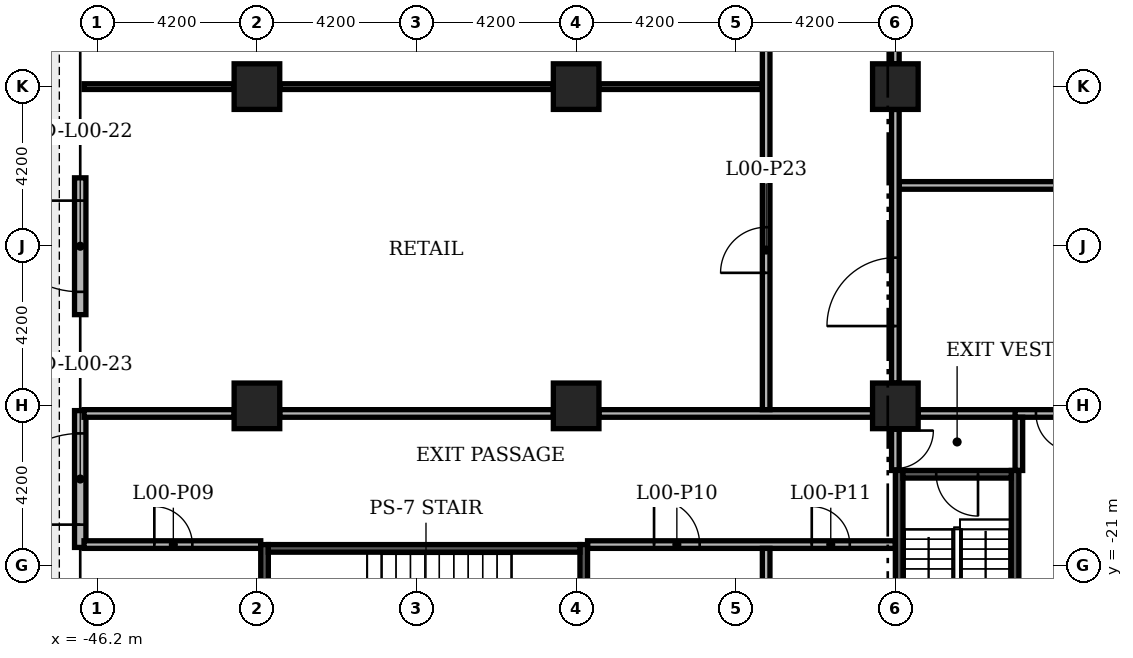
"""IFC4 building model, lengths in metres.
Left out: names, types, materials, properties, quantities, classifications, styles, units other than length and angle.
Written with IfcOpenShell. Run it as: python <this file> out.ifc"""

import sys

from ifc_helpers import new_model, si_unit, direction, frame, frame_2d, origin, origin_2d, place, context, subcontext, project, spatial, rectangle, extrude, element, fill, save


model = new_model("IFC4")
c1 = context("Model", 3, precision=1e-05, world=origin(), true_north=direction((0.0, 1.0)))
c2 = subcontext(c1, "Body", "Model", "MODEL_VIEW")
j1 = project(units=[si_unit("LENGTHUNIT", "METRE"), si_unit("PLANEANGLEUNIT", "RADIAN")], contexts=[c1])
p1 = place(None, origin())
s1 = spatial("IfcSite", under=j1, at=p1, CompositionType="ELEMENT")
p2 = place(p1, origin())
s2 = spatial("IfcBuilding", under=s1, at=p2, CompositionType="ELEMENT")
p3 = place(p2, origin())
s3 = spatial("IfcBuildingStorey", under=s2, at=p3, CompositionType="ELEMENT", Elevation=0.0)
for number, where, z_axis, x_axis in (
    (1, (-25.2, -8.4, 0.0), (0.0, 0.0, 1.0), (1.0, 0.0, 0.0)),
    (2, (-25.2, -16.8, 0.0), (0.0, 0.0, 1.0), (1.0, 0.0, 0.0)),
    (3, (-33.6, -8.4, 0.0), (0.0, 0.0, 1.0), (1.0, 0.0, 0.0)),
    (4, (-33.6, -16.8, 0.0), (0.0, 0.0, 1.0), (1.0, 0.0, 0.0)),
    (5, (-42.0, -8.4, 0.0), (0.0, 0.0, 1.0), (1.0, 0.0, 0.0)),
    (6, (-42.0, -16.8, 0.0), (0.0, 0.0, 1.0), (1.0, 0.0, 0.0)),
):
    element("IfcColumn", number, at=place(p3, frame(where, z_axis=z_axis, x_axis=x_axis)), inside=s3, PredefinedType="COLUMN", context=c2, shape_type="SweptSolid", body=[
        extrude(rectangle(XDim=1.2, YDim=1.2, at=origin_2d()), origin(), (0.0, 0.0, 1.0), 7.2),
    ])
p4 = place(p3, frame((-46.65, -10.8, 0.0), z_axis=(0.0, 0.0, 1.0), x_axis=(0.0, -1.0, 0.0)))
e7 = element("IfcWall", 7, at=p4, inside=s3, PredefinedType="STANDARD", context=c2, shape_type="SweptSolid", body=[
    extrude(rectangle(XDim=3.6, YDim=0.3, at=frame_2d((1.8, 0.0))), origin(), (0.0, 0.0, 1.0), 6.78),
])
p5 = place(p4, frame((0.6, 0.0, 0.0)))
e8 = element("IfcOpeningElement", 8, at=p5, cuts=e7, PredefinedType="OPENING", context=c2, shape_type="SweptSolid", body=[
    extrude(rectangle(XDim=2.4, YDim=2.4, at=frame_2d((1.2, 1.2))), frame((0.0, 0.16, 0.0), z_axis=(0.0, -1.0, 0.0), x_axis=(1.0, 0.0, 0.0)), (0.0, 0.0, 1.0), 0.32),
])
p6 = place(p3, frame((-46.65, -16.925, 0.0), z_axis=(0.0, 0.0, 1.0), x_axis=(0.0, -1.0, 0.0)))
e9 = element("IfcWall", 9, at=p6, inside=s3, PredefinedType="STANDARD", context=c2, shape_type="SweptSolid", body=[
    extrude(rectangle(XDim=3.6, YDim=0.3, at=frame_2d((1.8, 0.0))), origin(), (0.0, 0.0, 1.0), 6.78),
])
p7 = place(p6, frame((0.6, 0.0, 0.0)))
e10 = element("IfcOpeningElement", 10, at=p7, cuts=e9, PredefinedType="OPENING", context=c2, shape_type="SweptSolid", body=[
    extrude(rectangle(XDim=2.4, YDim=2.4, at=frame_2d((1.2, 1.2))), frame((0.0, 0.16, 0.0), z_axis=(0.0, -1.0, 0.0), x_axis=(1.0, 0.0, 0.0)), (0.0, 0.0, 1.0), 0.32),
])
p8 = place(p3, frame((-46.55, -20.45, 0.0), z_axis=(0.0, 0.0, 1.0), x_axis=(1.0, 0.0, 0.0)))
e11 = element("IfcWall", 11, at=p8, inside=s3, PredefinedType="PARTITIONING", context=c2, shape_type="SweptSolid", body=[
    extrude(rectangle(XDim=4.65, YDim=0.2, at=frame_2d((2.325, 0.0))), origin(), (0.0, 0.0, 1.0), 6.38),
])
p9 = place(p8, frame((1.85, 0.0, 0.0)))
e12 = element("IfcOpeningElement", 12, at=p9, cuts=e11, PredefinedType="OPENING", context=c2, shape_type="SweptSolid", body=[
    extrude(rectangle(XDim=1.0, YDim=2.1, at=frame_2d((0.5, 1.05))), frame((0.0, 0.11, 0.0), z_axis=(0.0, -1.0, 0.0), x_axis=(1.0, 0.0, 0.0)), (0.0, 0.0, 1.0), 0.22),
])
p10 = place(p3, frame((-33.3, -20.45, 0.0), z_axis=(0.0, 0.0, 1.0), x_axis=(1.0, 0.0, 0.0)))
e13 = element("IfcWall", 13, at=p10, inside=s3, PredefinedType="PARTITIONING", context=c2, shape_type="SweptSolid", body=[
    extrude(rectangle(XDim=8.1, YDim=0.2, at=frame_2d((4.05, 0.0))), origin(), (0.0, 0.0, 1.0), 6.78),
])
p11 = place(p10, frame((1.75, 0.0, 0.0)))
e14 = element("IfcOpeningElement", 14, at=p11, cuts=e13, PredefinedType="OPENING", context=c2, shape_type="SweptSolid", body=[
    extrude(rectangle(XDim=1.2, YDim=2.2, at=frame_2d((0.6, 1.1))), frame((0.0, 0.11, 0.0), z_axis=(0.0, -1.0, 0.0), x_axis=(1.0, 0.0, 0.0)), (0.0, 0.0, 1.0), 0.22),
])
p12 = place(p10, frame((5.9, 0.0, 0.0)))
e15 = element("IfcOpeningElement", 15, at=p12, cuts=e13, PredefinedType="OPENING", context=c2, shape_type="SweptSolid", body=[
    extrude(rectangle(XDim=1.0, YDim=2.1, at=frame_2d((0.5, 1.05))), frame((0.0, 0.11, 0.0), z_axis=(0.0, -1.0, 0.0), x_axis=(1.0, 0.0, 0.0)), (0.0, 0.0, 1.0), 0.22),
])
p13 = place(p3, frame((-46.55, -17.0, 0.0), z_axis=(0.0, 0.0, 1.0), x_axis=(1.0, 0.0, 0.0)))
e16 = element("IfcWall", 16, at=p13, inside=s3, PredefinedType="PARTITIONING", context=c2, shape_type="SweptSolid", body=[
    extrude(rectangle(XDim=3.95, YDim=0.2, at=frame_2d((1.975, 0.0))), origin(), (0.0, 0.0, 1.0), 6.48),
])
for number, where, z_axis, x_axis in (
    (17, (-41.4, -17.0, 0.0), (0.0, 0.0, 1.0), (1.0, 0.0, 0.0)),
    (18, (-33.0, -17.0, 0.0), (0.0, 0.0, 1.0), (1.0, 0.0, 0.0)),
):
    element("IfcWall", number, at=place(p3, frame(where, z_axis=z_axis, x_axis=x_axis)), inside=s3, PredefinedType="PARTITIONING", context=c2, shape_type="SweptSolid", body=[
        extrude(rectangle(XDim=7.2, YDim=0.2, at=frame_2d((3.6, 0.0))), origin(), (0.0, 0.0, 1.0), 6.48),
    ])
p14 = place(p3, frame((-24.6, -17.0, 0.0), z_axis=(0.0, 0.0, 1.0), x_axis=(1.0, 0.0, 0.0)))
e19 = element("IfcWall", 19, at=p14, inside=s3, PredefinedType="PARTITIONING", context=c2, shape_type="SweptSolid", body=[
    extrude(rectangle(XDim=2.75, YDim=0.2, at=frame_2d((1.375, 0.0))), origin(), (0.0, 0.0, 1.0), 6.78),
])
p15 = place(p3, frame((-22.05, -17.0, 0.0), z_axis=(0.0, 0.0, 1.0), x_axis=(1.0, 0.0, 0.0)))
e20 = element("IfcWall", 20, at=p15, inside=s3, PredefinedType="PARTITIONING", context=c2, shape_type="SweptSolid", body=[
    extrude(rectangle(XDim=44.1, YDim=0.2, at=frame_2d((22.05, 0.0))), origin(), (0.0, 0.0, 1.0), 6.78),
])
p16 = place(p15, frame((0.55, 0.0, 0.0)))
e21 = element("IfcOpeningElement", 21, at=p16, cuts=e20, PredefinedType="OPENING", context=c2, shape_type="SweptSolid", body=[
    extrude(rectangle(XDim=1.0, YDim=2.1, at=frame_2d((0.5, 1.05))), frame((0.0, 0.11, 0.0), z_axis=(0.0, -1.0, 0.0), x_axis=(1.0, 0.0, 0.0)), (0.0, 0.0, 1.0), 0.22),
])
p17 = place(p15, frame((12.85, 0.0, 0.0)))
e22 = element("IfcOpeningElement", 22, at=p17, cuts=e20, PredefinedType="OPENING", context=c2, shape_type="SweptSolid", body=[
    extrude(rectangle(XDim=2.4, YDim=2.4, at=frame_2d((1.2, 1.2))), frame((0.0, 0.11, 0.0), z_axis=(0.0, -1.0, 0.0), x_axis=(1.0, 0.0, 0.0)), (0.0, 0.0, 1.0), 0.22),
])
p18 = place(p15, frame((28.85, 0.0, 0.0)))
e23 = element("IfcOpeningElement", 23, at=p18, cuts=e20, PredefinedType="OPENING", context=c2, shape_type="SweptSolid", body=[
    extrude(rectangle(XDim=2.4, YDim=2.4, at=frame_2d((1.2, 1.2))), frame((0.0, 0.11, 0.0), z_axis=(0.0, -1.0, 0.0), x_axis=(1.0, 0.0, 0.0)), (0.0, 0.0, 1.0), 0.22),
])
p19 = place(p15, frame((42.55, 0.0, 0.0)))
e24 = element("IfcOpeningElement", 24, at=p19, cuts=e20, PredefinedType="OPENING", context=c2, shape_type="SweptSolid", body=[
    extrude(rectangle(XDim=1.0, YDim=2.1, at=frame_2d((0.5, 1.05))), frame((0.0, 0.11, 0.0), z_axis=(0.0, -1.0, 0.0), x_axis=(1.0, 0.0, 0.0)), (0.0, 0.0, 1.0), 0.22),
])
p20 = place(p3, frame((-25.1, -11.0, 0.0), z_axis=(0.0, 0.0, 1.0), x_axis=(1.0, 0.0, 0.0)))
e25 = element("IfcWall", 25, at=p20, inside=s3, PredefinedType="PARTITIONING", context=c2, shape_type="SweptSolid", body=[
    extrude(rectangle(XDim=14.1, YDim=0.2, at=frame_2d((7.05, 0.0))), origin(), (0.0, 0.0, 1.0), 6.78),
])
p21 = place(p20, frame((6.5, 0.0, 0.0)))
e26 = element("IfcOpeningElement", 26, at=p21, cuts=e25, PredefinedType="OPENING", context=c2, shape_type="SweptSolid", body=[
    extrude(rectangle(XDim=1.2, YDim=2.2, at=frame_2d((0.6, 1.1))), frame((0.0, 0.11, 0.0), z_axis=(0.0, -1.0, 0.0), x_axis=(1.0, 0.0, 0.0)), (0.0, 0.0, 1.0), 0.22),
])
p22 = place(p3, frame((-46.55, -8.4, 0.0), z_axis=(0.0, 0.0, 1.0), x_axis=(1.0, 0.0, 0.0)))
e27 = element("IfcWall", 27, at=p22, inside=s3, PredefinedType="PARTITIONING", context=c2, shape_type="SweptSolid", body=[
    extrude(rectangle(XDim=3.95, YDim=0.15, at=frame_2d((1.975, 0.0))), origin(), (0.0, 0.0, 1.0), 6.48),
])
p23 = place(p3, frame((-41.4, -8.4, 0.0), z_axis=(0.0, 0.0, 1.0), x_axis=(1.0, 0.0, 0.0)))
e28 = element("IfcWall", 28, at=p23, inside=s3, PredefinedType="PARTITIONING", context=c2, shape_type="SweptSolid", body=[
    extrude(rectangle(XDim=7.2, YDim=0.15, at=frame_2d((3.6, 0.0))), origin(), (0.0, 0.0, 1.0), 6.48),
])
p24 = place(p3, frame((-33.0, -8.4, 0.0), z_axis=(0.0, 0.0, 1.0), x_axis=(1.0, 0.0, 0.0)))
e29 = element("IfcWall", 29, at=p24, inside=s3, PredefinedType="PARTITIONING", context=c2, shape_type="SweptSolid", body=[
    extrude(rectangle(XDim=4.3, YDim=0.15, at=frame_2d((2.15, 0.0))), origin(), (0.0, 0.0, 1.0), 6.48),
])
p25 = place(p3, frame((-28.6, -24.5, 0.0), z_axis=(0.0, 0.0, 1.0), x_axis=(0.0, 1.0, 0.0)))
e30 = element("IfcWall", 30, at=p25, inside=s3, PredefinedType="PARTITIONING", context=c2, shape_type="SweptSolid", body=[
    extrude(rectangle(XDim=3.95, YDim=0.2, at=frame_2d((1.975, 0.0))), origin(), (0.0, 0.0, 1.0), 6.78),
])
p26 = place(p3, frame((-28.6, -16.9, 0.0), z_axis=(0.0, 0.0, 1.0), x_axis=(0.0, 1.0, 0.0)))
e31 = element("IfcWall", 31, at=p26, inside=s3, PredefinedType="PARTITIONING", context=c2, shape_type="SweptSolid", body=[
    extrude(rectangle(XDim=33.8, YDim=0.2, at=frame_2d((16.9, 0.0))), origin(), (0.0, 0.0, 1.0), 6.48),
])
p27 = place(p26, frame((3.6, 0.0, 0.0)))
e32 = element("IfcOpeningElement", 32, at=p27, cuts=e31, PredefinedType="OPENING", context=c2, shape_type="SweptSolid", body=[
    extrude(rectangle(XDim=1.2, YDim=2.2, at=frame_2d((0.6, 1.1))), frame((0.0, 0.11, 0.0), z_axis=(0.0, -1.0, 0.0), x_axis=(1.0, 0.0, 0.0)), (0.0, 0.0, 1.0), 0.22),
])
p28 = place(p26, frame((12.1, 0.0, 0.0)))
e33 = element("IfcOpeningElement", 33, at=p28, cuts=e31, PredefinedType="OPENING", context=c2, shape_type="SweptSolid", body=[
    extrude(rectangle(XDim=1.2, YDim=2.2, at=frame_2d((0.6, 1.1))), frame((0.0, 0.11, 0.0), z_axis=(0.0, -1.0, 0.0), x_axis=(1.0, 0.0, 0.0)), (0.0, 0.0, 1.0), 0.22),
])
p29 = place(p26, frame((20.5, 0.0, 0.0)))
e34 = element("IfcOpeningElement", 34, at=p29, cuts=e31, PredefinedType="OPENING", context=c2, shape_type="SweptSolid", body=[
    extrude(rectangle(XDim=1.2, YDim=2.2, at=frame_2d((0.6, 1.1))), frame((0.0, 0.11, 0.0), z_axis=(0.0, -1.0, 0.0), x_axis=(1.0, 0.0, 0.0)), (0.0, 0.0, 1.0), 0.22),
])
p30 = place(p26, frame((29.0, 0.0, 0.0)))
e35 = element("IfcOpeningElement", 35, at=p30, cuts=e31, PredefinedType="OPENING", context=c2, shape_type="SweptSolid", body=[
    extrude(rectangle(XDim=1.2, YDim=2.2, at=frame_2d((0.6, 1.1))), frame((0.0, 0.11, 0.0), z_axis=(0.0, -1.0, 0.0), x_axis=(1.0, 0.0, 0.0)), (0.0, 0.0, 1.0), 0.22),
])
p31 = place(p3, frame((-25.2, -18.5, 0.0), z_axis=(0.0, 0.0, 1.0), x_axis=(0.0, 1.0, 0.0)))
e36 = element("IfcWall", 36, at=p31, inside=s3, PredefinedType="PARTITIONING", context=c2, shape_type="SweptSolid", body=[
    extrude(rectangle(XDim=1.1, YDim=0.2, at=frame_2d((0.55, 0.0))), origin(), (0.0, 0.0, 1.0), 6.38),
])
p32 = place(p31, frame((0.05, 0.0, 0.0)))
e37 = element("IfcOpeningElement", 37, at=p32, cuts=e36, PredefinedType="OPENING", context=c2, shape_type="SweptSolid", body=[
    extrude(rectangle(XDim=1.0, YDim=2.2, at=frame_2d((0.5, 1.1))), frame((0.0, 0.11, 0.0), z_axis=(0.0, -1.0, 0.0), x_axis=(1.0, 0.0, 0.0)), (0.0, 0.0, 1.0), 0.22),
])
p33 = place(p3, frame((-25.2, -16.2, 0.0), z_axis=(0.0, 0.0, 1.0), x_axis=(0.0, 1.0, 0.0)))
e38 = element("IfcWall", 38, at=p33, inside=s3, PredefinedType="PARTITIONING", context=c2, shape_type="SweptSolid", body=[
    extrude(rectangle(XDim=7.2, YDim=0.2, at=frame_2d((3.6, 0.0))), origin(), (0.0, 0.0, 1.0), 6.48),
])
p34 = place(p33, frame((1.5, 0.0, 0.0)))
e39 = element("IfcOpeningElement", 39, at=p34, cuts=e38, PredefinedType="OPENING", context=c2, shape_type="SweptSolid", body=[
    extrude(rectangle(XDim=1.8, YDim=2.2, at=frame_2d((0.9, 1.1))), frame((0.0, 0.11, 0.0), z_axis=(0.0, -1.0, 0.0), x_axis=(1.0, 0.0, 0.0)), (0.0, 0.0, 1.0), 0.22),
])
p35 = place(p3, frame((-25.2, -7.8, 0.0), z_axis=(0.0, 0.0, 1.0), x_axis=(0.0, 1.0, 0.0)))
e40 = element("IfcWall", 40, at=p35, inside=s3, PredefinedType="PARTITIONING", context=c2, shape_type="SweptSolid", body=[
    extrude(rectangle(XDim=7.2, YDim=0.2, at=frame_2d((3.6, 0.0))), origin(), (0.0, 0.0, 1.0), 6.48),
])
p36 = place(p3, frame((-21.95, -18.5, 0.0), z_axis=(0.0, 0.0, 1.0), x_axis=(0.0, 1.0, 0.0)))
e41 = element("IfcWall", 41, at=p36, inside=s3, PredefinedType="PARTITIONING", context=c2, shape_type="SweptSolid", body=[
    extrude(rectangle(XDim=1.4, YDim=0.2, at=frame_2d((0.7, 0.0))), origin(), (0.0, 0.0, 1.0), 6.78),
])
p37 = place(p3, frame((-25.1, -25.24, 0.0), z_axis=(0.0, 0.0, 1.0), x_axis=(0.0, 1.0, 0.0)))
e42 = element("IfcWall", 42, at=p37, inside=s3, PredefinedType="SOLIDWALL", context=c2, shape_type="SweptSolid", body=[
    extrude(rectangle(XDim=6.74, YDim=0.2, at=frame_2d((3.37, 0.0))), origin(), (0.0, 0.0, 1.0), 6.38),
])
p38 = place(p3, frame((-22.05, -25.24, 0.0), z_axis=(0.0, 0.0, 1.0), x_axis=(0.0, 1.0, 0.0)))
e43 = element("IfcWall", 43, at=p38, inside=s3, PredefinedType="SOLIDWALL", context=c2, shape_type="SweptSolid", body=[
    extrude(rectangle(XDim=6.74, YDim=0.2, at=frame_2d((3.37, 0.0))), origin(), (0.0, 0.0, 1.0), 6.78),
])
p39 = place(p3, frame((-25.0, -18.6, 0.0), z_axis=(0.0, 0.0, 1.0), x_axis=(1.0, 0.0, 0.0)))
e44 = element("IfcWall", 44, at=p39, inside=s3, PredefinedType="SOLIDWALL", context=c2, shape_type="SweptSolid", body=[
    extrude(rectangle(XDim=2.85, YDim=0.2, at=frame_2d((1.425, 0.0))), origin(), (0.0, 0.0, 1.0), 6.78),
])
p40 = place(p39, frame((0.875, 0.0, 0.0)))
e45 = element("IfcOpeningElement", 45, at=p40, cuts=e44, PredefinedType="OPENING", context=c2, shape_type="SweptSolid", body=[
    extrude(rectangle(XDim=1.1, YDim=2.2, at=frame_2d((0.55, 1.1))), frame((0.0, 0.11, 0.0), z_axis=(0.0, -1.0, 0.0), x_axis=(1.0, 0.0, 0.0)), (0.0, 0.0, 1.0), 0.22),
])
p41 = place(p3, frame((-41.8, -24.6, 0.0), z_axis=(0.0, 0.0, 1.0), x_axis=(0.0, 1.0, 0.0)))
e46 = element("IfcWall", 46, at=p41, inside=s3, PredefinedType="SOLIDWALL", context=c2, shape_type="SweptSolid", body=[
    extrude(rectangle(XDim=4.15, YDim=0.2, at=frame_2d((2.075, 0.0))), origin(), (0.0, 0.0, 1.0), 6.38),
])
p42 = place(p3, frame((-33.4, -24.6, 0.0), z_axis=(0.0, 0.0, 1.0), x_axis=(0.0, 1.0, 0.0)))
e47 = element("IfcWall", 47, at=p42, inside=s3, PredefinedType="SOLIDWALL", context=c2, shape_type="SweptSolid", body=[
    extrude(rectangle(XDim=4.15, YDim=0.2, at=frame_2d((2.075, 0.0))), origin(), (0.0, 0.0, 1.0), 6.38),
])
p43 = place(p42, frame((1.175, 0.0, 0.0)))
e48 = element("IfcOpeningElement", 48, at=p43, cuts=e47, PredefinedType="OPENING", context=c2, shape_type="SweptSolid", body=[
    extrude(rectangle(XDim=1.8, YDim=2.2, at=frame_2d((0.9, 1.1))), frame((0.0, 0.11, 0.0), z_axis=(0.0, -1.0, 0.0), x_axis=(1.0, 0.0, 0.0)), (0.0, 0.0, 1.0), 0.22),
])
p44 = place(p3, frame((-41.7, -20.55, 0.0), z_axis=(0.0, 0.0, 1.0), x_axis=(1.0, 0.0, 0.0)))
e49 = element("IfcWall", 49, at=p44, inside=s3, PredefinedType="SOLIDWALL", context=c2, shape_type="SweptSolid", body=[
    extrude(rectangle(XDim=8.2, YDim=0.2, at=frame_2d((4.1, 0.0))), origin(), (0.0, 0.0, 1.0), 7.0),
])
p45 = place(p5, frame((2.4, 0.0, 0.0), z_axis=(0.0, 0.0, 1.0), x_axis=(-1.0, 0.0, 0.0)))
e50 = element("IfcDoor", 50, at=p45, inside=s3, OperationType="DOUBLE_DOOR_SINGLE_SWING", PredefinedType="DOOR", context=c2, shape_type="SweptSolid", body=[
    extrude(rectangle(XDim=2.4, YDim=2.4, at=frame_2d((1.2, 1.2))), frame((0.0, 0.025, 0.0), z_axis=(0.0, -1.0, 0.0), x_axis=(1.0, 0.0, 0.0)), (0.0, 0.0, 1.0), 0.05),
])
fill(e8, e50)
p46 = place(p7, frame((2.4, 0.0, 0.0), z_axis=(0.0, 0.0, 1.0), x_axis=(-1.0, 0.0, 0.0)))
e51 = element("IfcDoor", 51, at=p46, inside=s3, OperationType="SINGLE_SWING_RIGHT", PredefinedType="DOOR", context=c2, shape_type="SweptSolid", body=[
    extrude(rectangle(XDim=2.4, YDim=2.4, at=frame_2d((1.2, 1.2))), frame((0.0, 0.025, 0.0), z_axis=(0.0, -1.0, 0.0), x_axis=(1.0, 0.0, 0.0)), (0.0, 0.0, 1.0), 0.05),
])
fill(e10, e51)
p47 = place(p9, origin())
e52 = element("IfcDoor", 52, at=p47, inside=s3, OperationType="SINGLE_SWING_LEFT", PredefinedType="DOOR", context=c2, shape_type="SweptSolid", body=[
    extrude(rectangle(XDim=1.0, YDim=2.1, at=frame_2d((0.5, 1.05))), frame((0.0, 0.025, 0.0), z_axis=(0.0, -1.0, 0.0), x_axis=(1.0, 0.0, 0.0)), (0.0, 0.0, 1.0), 0.05),
])
fill(e12, e52)
p48 = place(p11, origin())
e53 = element("IfcDoor", 53, at=p48, inside=s3, OperationType="SINGLE_SWING_LEFT", PredefinedType="DOOR", context=c2, shape_type="SweptSolid", body=[
    extrude(rectangle(XDim=1.2, YDim=2.2, at=frame_2d((0.6, 1.1))), frame((0.0, 0.025, 0.0), z_axis=(0.0, -1.0, 0.0), x_axis=(1.0, 0.0, 0.0)), (0.0, 0.0, 1.0), 0.05),
])
fill(e14, e53)
p49 = place(p12, origin())
e54 = element("IfcDoor", 54, at=p49, inside=s3, OperationType="SINGLE_SWING_LEFT", PredefinedType="DOOR", context=c2, shape_type="SweptSolid", body=[
    extrude(rectangle(XDim=1.0, YDim=2.1, at=frame_2d((0.5, 1.05))), frame((0.0, 0.025, 0.0), z_axis=(0.0, -1.0, 0.0), x_axis=(1.0, 0.0, 0.0)), (0.0, 0.0, 1.0), 0.05),
])
fill(e15, e54)
p50 = place(p32, origin())
e55 = element("IfcDoor", 55, at=p50, inside=s3, OperationType="SINGLE_SWING_RIGHT", PredefinedType="DOOR", context=c2, shape_type="SweptSolid", body=[
    extrude(rectangle(XDim=1.0, YDim=2.2, at=frame_2d((0.5, 1.1))), frame((0.0, 0.025, 0.0), z_axis=(0.0, -1.0, 0.0), x_axis=(1.0, 0.0, 0.0)), (0.0, 0.0, 1.0), 0.05),
])
fill(e37, e55)
p51 = place(p16, origin())
e56 = element("IfcDoor", 56, at=p51, inside=s3, OperationType="SINGLE_SWING_RIGHT", PredefinedType="DOOR", context=c2, shape_type="SweptSolid", body=[
    extrude(rectangle(XDim=1.0, YDim=2.1, at=frame_2d((0.5, 1.05))), frame((0.0, 0.025, 0.0), z_axis=(0.0, -1.0, 0.0), x_axis=(1.0, 0.0, 0.0)), (0.0, 0.0, 1.0), 0.05),
])
fill(e21, e56)
p52 = place(p34, origin())
e57 = element("IfcDoor", 57, at=p52, inside=s3, OperationType="DOUBLE_DOOR_SINGLE_SWING", PredefinedType="DOOR", context=c2, shape_type="SweptSolid", body=[
    extrude(rectangle(XDim=1.8, YDim=2.2, at=frame_2d((0.9, 1.1))), frame((0.0, 0.025, 0.0), z_axis=(0.0, -1.0, 0.0), x_axis=(1.0, 0.0, 0.0)), (0.0, 0.0, 1.0), 0.05),
])
fill(e39, e57)
p53 = place(p27, origin())
e58 = element("IfcDoor", 58, at=p53, inside=s3, OperationType="SINGLE_SWING_LEFT", PredefinedType="DOOR", context=c2, shape_type="SweptSolid", body=[
    extrude(rectangle(XDim=1.2, YDim=2.2, at=frame_2d((0.6, 1.1))), frame((0.0, 0.025, 0.0), z_axis=(0.0, -1.0, 0.0), x_axis=(1.0, 0.0, 0.0)), (0.0, 0.0, 1.0), 0.05),
])
fill(e32, e58)
p54 = place(p40, origin())
e59 = element("IfcDoor", 59, at=p54, inside=s3, OperationType="SINGLE_SWING_RIGHT", PredefinedType="DOOR", context=c2, shape_type="SweptSolid", body=[
    extrude(rectangle(XDim=1.1, YDim=2.2, at=frame_2d((0.55, 1.1))), frame((0.0, 0.025, 0.0), z_axis=(0.0, -1.0, 0.0), x_axis=(1.0, 0.0, 0.0)), (0.0, 0.0, 1.0), 0.05),
])
fill(e45, e59)
save(model, sys.argv[1])
